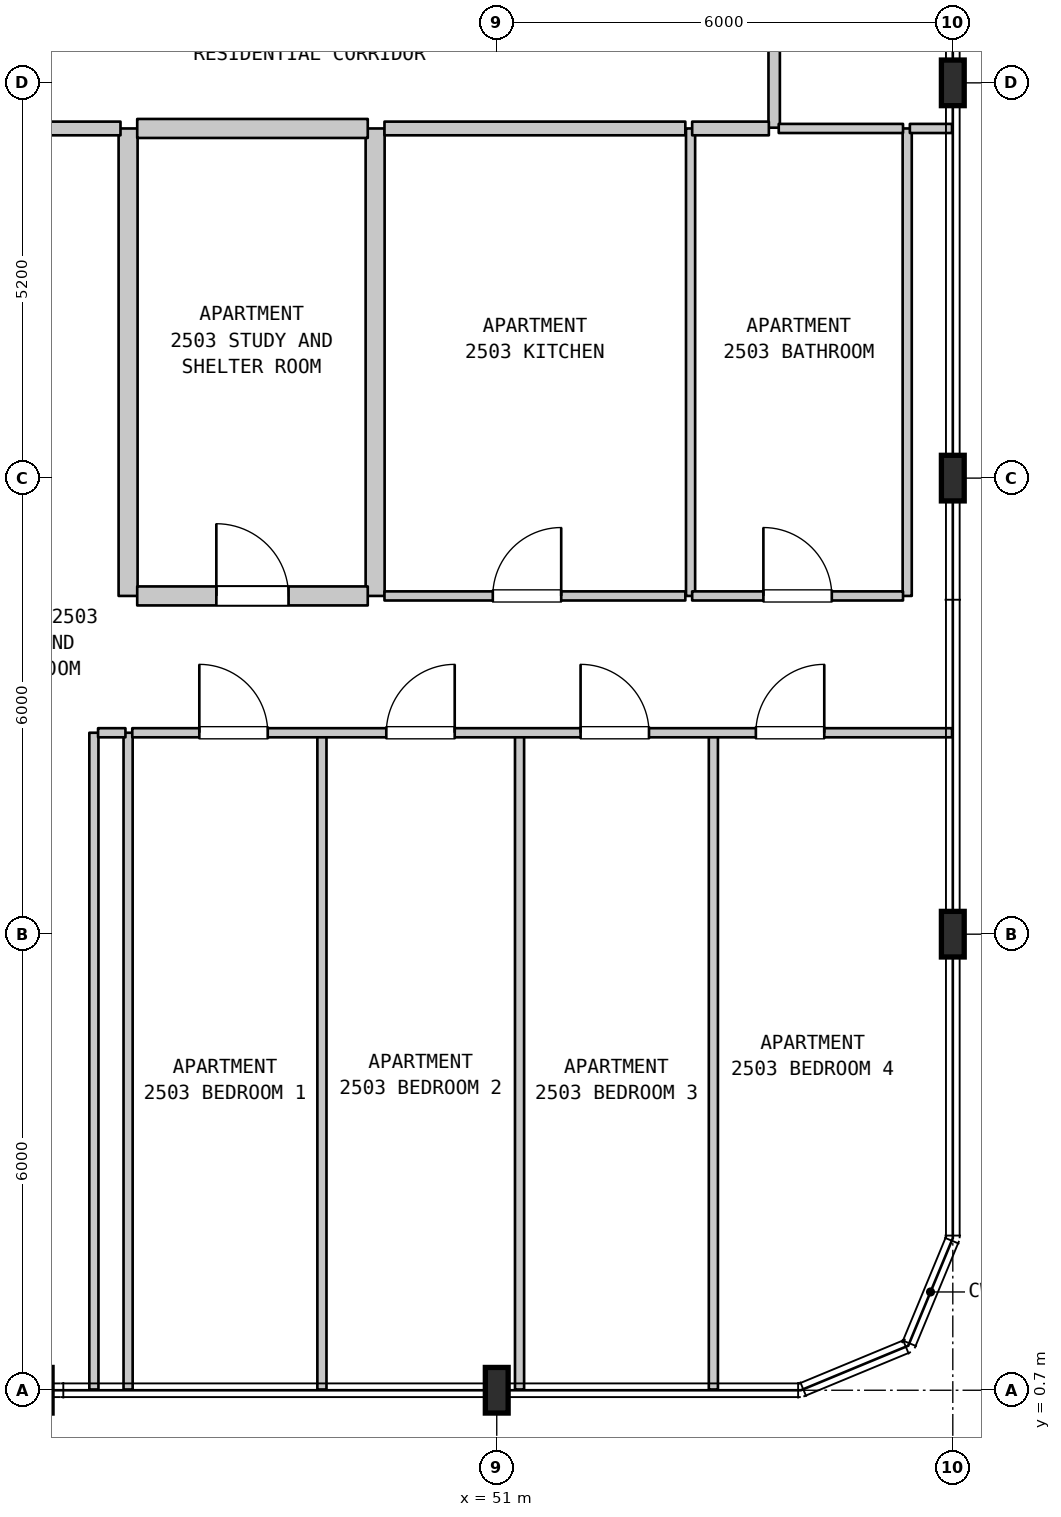
"""IFC4 building model, lengths in metres.
Left out: names, types, materials, properties, quantities, classifications, styles, units other than length and angle.
Written with IfcOpenShell. Run it as: python <this file> out.ifc"""

import sys

from ifc_helpers import new_model, si_unit, direction, frame, frame_2d, origin, origin_2d, place, context, subcontext, project, spatial, rectangle, i_section, extrude, element, fill, save


model = new_model("IFC4")
c1 = context("Model", 3, precision=1e-05, world=origin(), true_north=direction((0.0, 1.0)))
c2 = subcontext(c1, "Body", "Model", "MODEL_VIEW")
j1 = project(units=[si_unit("LENGTHUNIT", "METRE"), si_unit("PLANEANGLEUNIT", "RADIAN")], contexts=[c1])
p1 = place(None, origin())
s1 = spatial("IfcSite", under=j1, at=p1, CompositionType="ELEMENT")
p2 = place(p1, origin())
s2 = spatial("IfcBuilding", under=s1, at=p2, CompositionType="ELEMENT")
p3 = place(p2, frame((0.0, 0.0, 105.7)))
s3 = spatial("IfcBuildingStorey", under=s2, at=p3, CompositionType="ELEMENT", Elevation=105.7)
for number, where, z_axis, x_axis in (
    (1, (51.0, 0.7, 0.0), (0.0, 0.0, 1.0), (1.0, 0.0, 0.0)),
    (2, (57.0, 6.7, 0.0), (0.0, 0.0, 1.0), (1.0, 0.0, 0.0)),
    (3, (57.0, 12.7, 0.0), (0.0, 0.0, 1.0), (1.0, 0.0, 0.0)),
    (4, (57.0, 17.9, 0.0), (0.0, 0.0, 1.0), (1.0, 0.0, 0.0)),
):
    element("IfcColumn", number, at=place(p3, frame(where, z_axis=z_axis, x_axis=x_axis)), inside=s3, PredefinedType="COLUMN", context=c2, shape_type="SweptSolid", body=[
        extrude(i_section(OverallWidth=0.3, OverallDepth=0.6, WebThickness=0.015, FlangeThickness=0.03, FilletRadius=0.027, at=origin_2d()), origin(), (0.0, 0.0, 1.0), 3.7),
    ])
for number, where, z_axis, x_axis in (
    (5, (45.7, 0.71, 0.0), (0.0, 0.0, 1.0), (0.0, 1.0, 0.0)),
    (6, (46.15, 0.71, 0.0), (0.0, 0.0, 1.0), (0.0, 1.0, 0.0)),
):
    element("IfcWall", number, at=place(p3, frame(where, z_axis=z_axis, x_axis=x_axis)), inside=s3, PredefinedType="PARTITIONING", context=c2, shape_type="SweptSolid", body=[
        extrude(rectangle(XDim=8.64, YDim=0.12, at=frame_2d((4.32, 0.0))), origin(), (0.0, 0.0, 1.0), 3.385),
    ])
p4 = place(p3, frame((46.15, 11.15, 0.0), z_axis=(0.0, 0.0, 1.0), x_axis=(0.0, 1.0, 0.0)))
e7 = element("IfcWall", 7, at=p4, inside=s3, PredefinedType="STANDARD", context=c2, shape_type="SweptSolid", body=[
    extrude(rectangle(XDim=6.15, YDim=0.25, at=frame_2d((3.075, 0.0))), origin(), (0.0, 0.0, 1.0), 3.385),
])
p5 = place(p3, frame((48.7, 0.71, 0.0), z_axis=(0.0, 0.0, 1.0), x_axis=(0.0, 1.0, 0.0)))
e8 = element("IfcWall", 8, at=p5, inside=s3, PredefinedType="PARTITIONING", context=c2, shape_type="SweptSolid", body=[
    extrude(rectangle(XDim=8.64, YDim=0.12, at=frame_2d((4.32, 0.0))), origin(), (0.0, 0.0, 1.0), 3.385),
])
p6 = place(p3, frame((49.4, 11.15, 0.0), z_axis=(0.0, 0.0, 1.0), x_axis=(0.0, 1.0, 0.0)))
e9 = element("IfcWall", 9, at=p6, inside=s3, PredefinedType="STANDARD", context=c2, shape_type="SweptSolid", body=[
    extrude(rectangle(XDim=6.15, YDim=0.25, at=frame_2d((3.075, 0.0))), origin(), (0.0, 0.0, 1.0), 3.385),
])
p7 = place(p3, frame((51.3, 0.71, 0.0), z_axis=(0.0, 0.0, 1.0), x_axis=(0.0, 1.0, 0.0)))
e10 = element("IfcWall", 10, at=p7, inside=s3, PredefinedType="PARTITIONING", context=c2, shape_type="SweptSolid", body=[
    extrude(rectangle(XDim=8.64, YDim=0.12, at=frame_2d((4.32, 0.0))), origin(), (0.0, 0.0, 1.0), 3.385),
])
p8 = place(p3, frame((53.55, 11.15, 0.0), z_axis=(0.0, 0.0, 1.0), x_axis=(0.0, 1.0, 0.0)))
e11 = element("IfcWall", 11, at=p8, inside=s3, PredefinedType="PARTITIONING", context=c2, shape_type="SweptSolid", body=[
    extrude(rectangle(XDim=6.15, YDim=0.12, at=frame_2d((3.075, 0.0))), origin(), (0.0, 0.0, 1.0), 3.385),
])
p9 = place(p3, frame((53.85, 0.71, 0.0), z_axis=(0.0, 0.0, 1.0), x_axis=(0.0, 1.0, 0.0)))
e12 = element("IfcWall", 12, at=p9, inside=s3, PredefinedType="PARTITIONING", context=c2, shape_type="SweptSolid", body=[
    extrude(rectangle(XDim=8.64, YDim=0.12, at=frame_2d((4.32, 0.0))), origin(), (0.0, 0.0, 1.0), 3.385),
])
p10 = place(p3, frame((54.65, 17.31, 0.0), z_axis=(0.0, 0.0, 1.0), x_axis=(0.0, 1.0, 0.0)))
e13 = element("IfcWall", 13, at=p10, inside=s3, PredefinedType="STANDARD", context=c2, shape_type="SweptSolid", body=[
    extrude(rectangle(XDim=2.19, YDim=0.15, at=frame_2d((1.095, 0.0))), origin(), (0.0, 0.0, 1.0), 3.385),
])
p11 = place(p3, frame((56.4, 11.15, 0.0), z_axis=(0.0, 0.0, 1.0), x_axis=(0.0, 1.0, 0.0)))
e14 = element("IfcWall", 14, at=p11, inside=s3, PredefinedType="PARTITIONING", context=c2, shape_type="SweptSolid", body=[
    extrude(rectangle(XDim=6.15, YDim=0.12, at=frame_2d((3.075, 0.0))), origin(), (0.0, 0.0, 1.0), 3.385),
])
p12 = place(p3, frame((45.755, 9.35, 0.0), z_axis=(0.0, 0.0, 1.0), x_axis=(1.0, 0.0, 0.0)))
e15 = element("IfcWall", 15, at=p12, inside=s3, PredefinedType="PARTITIONING", context=c2, shape_type="SweptSolid", body=[
    extrude(rectangle(XDim=0.36, YDim=0.12, at=frame_2d((0.18, 0.0))), origin(), (0.0, 0.0, 1.0), 3.385),
])
p13 = place(p3, frame((46.205, 9.35, 0.0), z_axis=(0.0, 0.0, 1.0), x_axis=(1.0, 0.0, 0.0)))
e16 = element("IfcWall", 16, at=p13, inside=s3, PredefinedType="PARTITIONING", context=c2, shape_type="SweptSolid", body=[
    extrude(rectangle(XDim=10.785, YDim=0.12, at=frame_2d((5.393, 0.0))), origin(), (0.0, 0.0, 1.0), 3.385),
])
p14 = place(p13, frame((0.882, 0.0, 0.0)))
e17 = element("IfcOpeningElement", 17, at=p14, cuts=e16, PredefinedType="OPENING", context=c2, shape_type="SweptSolid", body=[
    extrude(rectangle(XDim=0.9, YDim=2.15, at=frame_2d((0.45, 1.075))), frame((0.0, 0.07, 0.0), z_axis=(0.0, -1.0, 0.0), x_axis=(1.0, 0.0, 0.0)), (0.0, 0.0, 1.0), 0.14),
])
p15 = place(p13, frame((3.342, 0.0, 0.0)))
e18 = element("IfcOpeningElement", 18, at=p15, cuts=e16, PredefinedType="OPENING", context=c2, shape_type="SweptSolid", body=[
    extrude(rectangle(XDim=0.9, YDim=2.15, at=frame_2d((0.45, 1.075))), frame((0.0, 0.07, 0.0), z_axis=(0.0, -1.0, 0.0), x_axis=(1.0, 0.0, 0.0)), (0.0, 0.0, 1.0), 0.14),
])
p16 = place(p13, frame((5.898, 0.0, 0.0)))
e19 = element("IfcOpeningElement", 19, at=p16, cuts=e16, PredefinedType="OPENING", context=c2, shape_type="SweptSolid", body=[
    extrude(rectangle(XDim=0.9, YDim=2.15, at=frame_2d((0.45, 1.075))), frame((0.0, 0.07, 0.0), z_axis=(0.0, -1.0, 0.0), x_axis=(1.0, 0.0, 0.0)), (0.0, 0.0, 1.0), 0.14),
])
p17 = place(p13, frame((8.204, 0.0, 0.0)))
e20 = element("IfcOpeningElement", 20, at=p17, cuts=e16, PredefinedType="OPENING", context=c2, shape_type="SweptSolid", body=[
    extrude(rectangle(XDim=0.9, YDim=2.15, at=frame_2d((0.45, 1.075))), frame((0.0, 0.07, 0.0), z_axis=(0.0, -1.0, 0.0), x_axis=(1.0, 0.0, 0.0)), (0.0, 0.0, 1.0), 0.14),
])
p18 = place(p3, frame((46.27, 11.15, 0.0), z_axis=(0.0, 0.0, 1.0), x_axis=(1.0, 0.0, 0.0)))
e21 = element("IfcWall", 21, at=p18, inside=s3, PredefinedType="STANDARD", context=c2, shape_type="SweptSolid", body=[
    extrude(rectangle(XDim=3.033, YDim=0.25, at=frame_2d((1.517, 0.0))), origin(), (0.0, 0.0, 1.0), 3.385),
])
p19 = place(p18, frame((1.041, 0.0, 0.0)))
e22 = element("IfcOpeningElement", 22, at=p19, cuts=e21, PredefinedType="OPENING", context=c2, shape_type="SweptSolid", body=[
    extrude(rectangle(XDim=0.95, YDim=2.15, at=frame_2d((0.475, 1.075))), frame((0.0, 0.135, 0.0), z_axis=(0.0, -1.0, 0.0), x_axis=(1.0, 0.0, 0.0)), (0.0, 0.0, 1.0), 0.27),
])
p20 = place(p3, frame((49.523, 11.15, 0.0), z_axis=(0.0, 0.0, 1.0), x_axis=(1.0, 0.0, 0.0)))
e23 = element("IfcWall", 23, at=p20, inside=s3, PredefinedType="PARTITIONING", context=c2, shape_type="SweptSolid", body=[
    extrude(rectangle(XDim=3.958, YDim=0.12, at=frame_2d((1.979, 0.0))), origin(), (0.0, 0.0, 1.0), 3.385),
])
p21 = place(p20, frame((1.425, 0.0, 0.0)))
e24 = element("IfcOpeningElement", 24, at=p21, cuts=e23, PredefinedType="OPENING", context=c2, shape_type="SweptSolid", body=[
    extrude(rectangle(XDim=0.9, YDim=2.15, at=frame_2d((0.45, 1.075))), frame((0.0, 0.07, 0.0), z_axis=(0.0, -1.0, 0.0), x_axis=(1.0, 0.0, 0.0)), (0.0, 0.0, 1.0), 0.14),
])
p22 = place(p3, frame((53.571, 11.15, 0.0), z_axis=(0.0, 0.0, 1.0), x_axis=(1.0, 0.0, 0.0)))
e25 = element("IfcWall", 25, at=p22, inside=s3, PredefinedType="PARTITIONING", context=c2, shape_type="SweptSolid", body=[
    extrude(rectangle(XDim=2.774, YDim=0.12, at=frame_2d((1.387, 0.0))), origin(), (0.0, 0.0, 1.0), 3.385),
])
p23 = place(p22, frame((0.937, 0.0, 0.0)))
e26 = element("IfcOpeningElement", 26, at=p23, cuts=e25, PredefinedType="OPENING", context=c2, shape_type="SweptSolid", body=[
    extrude(rectangle(XDim=0.9, YDim=2.1, at=frame_2d((0.45, 1.05))), frame((0.0, 0.07, 0.0), z_axis=(0.0, -1.0, 0.0), x_axis=(1.0, 0.0, 0.0)), (0.0, 0.0, 1.0), 0.14),
])
p24 = place(p3, frame((40.505, 17.3, 0.0), z_axis=(0.0, 0.0, 1.0), x_axis=(1.0, 0.0, 0.0)))
e27 = element("IfcWall", 27, at=p24, inside=s3, PredefinedType="STANDARD", context=c2, shape_type="SweptSolid", body=[
    extrude(rectangle(XDim=5.545, YDim=0.18, at=frame_2d((2.772, 0.0))), origin(), (0.0, 0.0, 1.0), 3.385),
])
p25 = place(p24, frame((2.435, 0.0, 0.0)))
e28 = element("IfcOpeningElement", 28, at=p25, cuts=e27, PredefinedType="OPENING", context=c2, shape_type="SweptSolid", body=[
    extrude(rectangle(XDim=1.0, YDim=2.15, at=frame_2d((0.5, 1.075))), frame((0.0, 0.1, 0.0), z_axis=(0.0, -1.0, 0.0), x_axis=(1.0, 0.0, 0.0)), (0.0, 0.0, 1.0), 0.2),
])
p26 = place(p3, frame((46.27, 17.3, 0.0), z_axis=(0.0, 0.0, 1.0), x_axis=(1.0, 0.0, 0.0)))
e29 = element("IfcWall", 29, at=p26, inside=s3, PredefinedType="STANDARD", context=c2, shape_type="SweptSolid", body=[
    extrude(rectangle(XDim=3.033, YDim=0.25, at=frame_2d((1.517, 0.0))), origin(), (0.0, 0.0, 1.0), 3.385),
])
p27 = place(p3, frame((49.523, 17.3, 0.0), z_axis=(0.0, 0.0, 1.0), x_axis=(1.0, 0.0, 0.0)))
e30 = element("IfcWall", 30, at=p27, inside=s3, PredefinedType="STANDARD", context=c2, shape_type="SweptSolid", body=[
    extrude(rectangle(XDim=3.958, YDim=0.18, at=frame_2d((1.979, 0.0))), origin(), (0.0, 0.0, 1.0), 3.385),
])
p28 = place(p3, frame((53.571, 17.3, 0.0), z_axis=(0.0, 0.0, 1.0), x_axis=(1.0, 0.0, 0.0)))
e31 = element("IfcWall", 31, at=p28, inside=s3, PredefinedType="STANDARD", context=c2, shape_type="SweptSolid", body=[
    extrude(rectangle(XDim=1.009, YDim=0.18, at=frame_2d((0.504, 0.0))), origin(), (0.0, 0.0, 1.0), 3.385),
])
p29 = place(p3, frame((54.71, 17.3, 0.0), z_axis=(0.0, 0.0, 1.0), x_axis=(1.0, 0.0, 0.0)))
e32 = element("IfcWall", 32, at=p29, inside=s3, PredefinedType="PARTITIONING", context=c2, shape_type="SweptSolid", body=[
    extrude(rectangle(XDim=1.635, YDim=0.12, at=frame_2d((0.817, 0.0))), origin(), (0.0, 0.0, 1.0), 3.385),
])
p30 = place(p3, frame((56.435, 17.3, 0.0), z_axis=(0.0, 0.0, 1.0), x_axis=(1.0, 0.0, 0.0)))
e33 = element("IfcWall", 33, at=p30, inside=s3, PredefinedType="PARTITIONING", context=c2, shape_type="SweptSolid", body=[
    extrude(rectangle(XDim=0.555, YDim=0.12, at=frame_2d((0.277, 0.0))), origin(), (0.0, 0.0, 1.0), 3.385),
])
p31 = place(p14, origin())
e34 = element("IfcDoor", 34, at=p31, inside=s3, OperationType="SINGLE_SWING_LEFT", PredefinedType="DOOR", context=c2, shape_type="SweptSolid", body=[
    extrude(rectangle(XDim=0.9, YDim=2.15, at=frame_2d((0.45, 1.075))), frame((0.0, 0.025, 0.0), z_axis=(0.0, -1.0, 0.0), x_axis=(1.0, 0.0, 0.0)), (0.0, 0.0, 1.0), 0.05),
])
fill(e17, e34)
p32 = place(p15, origin())
e35 = element("IfcDoor", 35, at=p32, inside=s3, OperationType="SINGLE_SWING_RIGHT", PredefinedType="DOOR", context=c2, shape_type="SweptSolid", body=[
    extrude(rectangle(XDim=0.9, YDim=2.15, at=frame_2d((0.45, 1.075))), frame((0.0, 0.025, 0.0), z_axis=(0.0, -1.0, 0.0), x_axis=(1.0, 0.0, 0.0)), (0.0, 0.0, 1.0), 0.05),
])
fill(e18, e35)
p33 = place(p16, origin())
e36 = element("IfcDoor", 36, at=p33, inside=s3, OperationType="SINGLE_SWING_LEFT", PredefinedType="DOOR", context=c2, shape_type="SweptSolid", body=[
    extrude(rectangle(XDim=0.9, YDim=2.15, at=frame_2d((0.45, 1.075))), frame((0.0, 0.025, 0.0), z_axis=(0.0, -1.0, 0.0), x_axis=(1.0, 0.0, 0.0)), (0.0, 0.0, 1.0), 0.05),
])
fill(e19, e36)
p34 = place(p17, origin())
e37 = element("IfcDoor", 37, at=p34, inside=s3, OperationType="SINGLE_SWING_RIGHT", PredefinedType="DOOR", context=c2, shape_type="SweptSolid", body=[
    extrude(rectangle(XDim=0.9, YDim=2.15, at=frame_2d((0.45, 1.075))), frame((0.0, 0.025, 0.0), z_axis=(0.0, -1.0, 0.0), x_axis=(1.0, 0.0, 0.0)), (0.0, 0.0, 1.0), 0.05),
])
fill(e20, e37)
p35 = place(p19, origin())
e38 = element("IfcDoor", 38, at=p35, inside=s3, OperationType="SINGLE_SWING_LEFT", PredefinedType="DOOR", context=c2, shape_type="SweptSolid", body=[
    extrude(rectangle(XDim=0.95, YDim=2.15, at=frame_2d((0.475, 1.075))), frame((0.0, 0.025, 0.0), z_axis=(0.0, -1.0, 0.0), x_axis=(1.0, 0.0, 0.0)), (0.0, 0.0, 1.0), 0.05),
])
fill(e22, e38)
p36 = place(p21, origin())
e39 = element("IfcDoor", 39, at=p36, inside=s3, OperationType="SINGLE_SWING_RIGHT", PredefinedType="DOOR", context=c2, shape_type="SweptSolid", body=[
    extrude(rectangle(XDim=0.9, YDim=2.15, at=frame_2d((0.45, 1.075))), frame((0.0, 0.025, 0.0), z_axis=(0.0, -1.0, 0.0), x_axis=(1.0, 0.0, 0.0)), (0.0, 0.0, 1.0), 0.05),
])
fill(e24, e39)
p37 = place(p23, origin())
e40 = element("IfcDoor", 40, at=p37, inside=s3, OperationType="SINGLE_SWING_LEFT", PredefinedType="DOOR", context=c2, shape_type="SweptSolid", body=[
    extrude(rectangle(XDim=0.9, YDim=2.1, at=frame_2d((0.45, 1.05))), frame((0.0, 0.025, 0.0), z_axis=(0.0, -1.0, 0.0), x_axis=(1.0, 0.0, 0.0)), (0.0, 0.0, 1.0), 0.05),
])
fill(e26, e40)
save(model, sys.argv[1])
